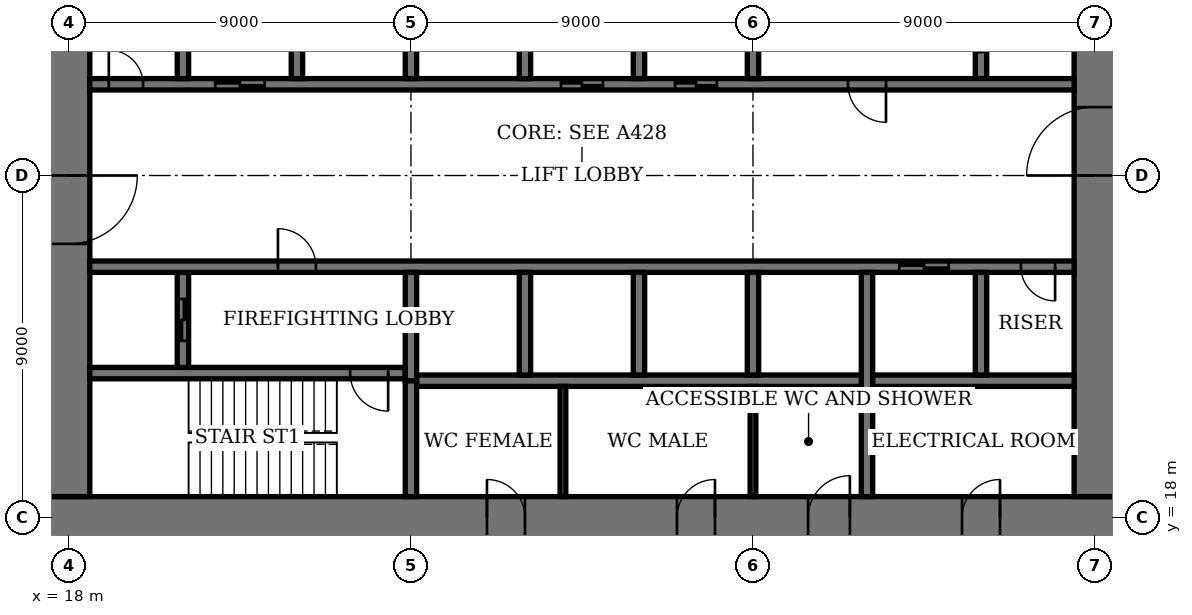
"""IFC4 building model, lengths in metres.
Left out: names, types, materials, properties, quantities, classifications, styles, units other than length and angle.
Written with IfcOpenShell. Run it as: python <this file> out.ifc"""

import sys

from ifc_helpers import new_model, si_unit, direction, frame, frame_2d, origin, place, context, subcontext, project, spatial, rectangle, extrude, element, fill, save


model = new_model("IFC4")
c1 = context("Model", 3, precision=1e-05, world=origin(), true_north=direction((0.0, 1.0)))
c2 = subcontext(c1, "Body", "Model", "MODEL_VIEW")
j1 = project(units=[si_unit("LENGTHUNIT", "METRE"), si_unit("PLANEANGLEUNIT", "RADIAN")], contexts=[c1])
p1 = place(None, origin())
s1 = spatial("IfcSite", under=j1, at=p1, CompositionType="ELEMENT")
p2 = place(p1, origin())
s2 = spatial("IfcBuilding", under=s1, at=p2, CompositionType="ELEMENT")
p3 = place(p2, frame((0.0, 0.0, 113.0)))
s3 = spatial("IfcBuildingStorey", under=s2, at=p3, CompositionType="ELEMENT", Elevation=113.0)
p4 = place(p3, frame((17.45, 18.0, 0.0), z_axis=(0.0, 0.0, 1.0), x_axis=(1.0, 0.0, 0.0)))
e1 = element("IfcWall", 1, at=p4, inside=s3, PredefinedType="SHEAR", context=c2, shape_type="SweptSolid", body=[
    extrude(rectangle(XDim=28.1, YDim=1.1, at=frame_2d((14.05, 0.0))), origin(), (0.0, 0.0, 1.0), 4.0),
])
p5 = place(p4, frame((11.55, 0.0, 0.0)))
e2 = element("IfcOpeningElement", 2, at=p5, cuts=e1, PredefinedType="OPENING", context=c2, shape_type="SweptSolid", body=[
    extrude(rectangle(XDim=1.0, YDim=2.4, at=frame_2d((0.5, 1.2))), frame((0.0, 0.56, 0.0), z_axis=(0.0, -1.0, 0.0), x_axis=(1.0, 0.0, 0.0)), (0.0, 0.0, 1.0), 1.12),
])
p6 = place(p4, frame((16.55, 0.0, 0.0)))
e3 = element("IfcOpeningElement", 3, at=p6, cuts=e1, PredefinedType="OPENING", context=c2, shape_type="SweptSolid", body=[
    extrude(rectangle(XDim=1.0, YDim=2.4, at=frame_2d((0.5, 1.2))), frame((0.0, 0.56, 0.0), z_axis=(0.0, -1.0, 0.0), x_axis=(1.0, 0.0, 0.0)), (0.0, 0.0, 1.0), 1.12),
])
p7 = place(p4, frame((20.0, 0.0, 0.0)))
e4 = element("IfcOpeningElement", 4, at=p7, cuts=e1, PredefinedType="OPENING", context=c2, shape_type="SweptSolid", body=[
    extrude(rectangle(XDim=1.1, YDim=2.4, at=frame_2d((0.55, 1.2))), frame((0.0, 0.56, 0.0), z_axis=(0.0, -1.0, 0.0), x_axis=(1.0, 0.0, 0.0)), (0.0, 0.0, 1.0), 1.12),
])
p8 = place(p4, frame((24.05, 0.0, 0.0)))
e5 = element("IfcOpeningElement", 5, at=p8, cuts=e1, PredefinedType="OPENING", context=c2, shape_type="SweptSolid", body=[
    extrude(rectangle(XDim=1.0, YDim=2.4, at=frame_2d((0.5, 1.2))), frame((0.0, 0.56, 0.0), z_axis=(0.0, -1.0, 0.0), x_axis=(1.0, 0.0, 0.0)), (0.0, 0.0, 1.0), 1.12),
])
p9 = place(p3, frame((18.0, 35.45, 0.0), z_axis=(0.0, 0.0, 1.0), x_axis=(0.0, -1.0, 0.0)))
e6 = element("IfcWall", 6, at=p9, inside=s3, PredefinedType="SHEAR", context=c2, shape_type="SweptSolid", body=[
    extrude(rectangle(XDim=16.9, YDim=1.1, at=frame_2d((8.45, 0.0))), origin(), (0.0, 0.0, 1.0), 4.0),
])
p10 = place(p9, frame((8.45, 0.0, 0.0)))
e7 = element("IfcOpeningElement", 7, at=p10, cuts=e6, PredefinedType="OPENING", context=c2, shape_type="SweptSolid", body=[
    extrude(rectangle(XDim=1.8, YDim=2.4, at=frame_2d((0.9, 1.2))), frame((0.0, 0.56, 0.0), z_axis=(0.0, -1.0, 0.0), x_axis=(1.0, 0.0, 0.0)), (0.0, 0.0, 1.0), 1.12),
])
p11 = place(p3, frame((45.0, 18.55, 0.0), z_axis=(0.0, 0.0, 1.0), x_axis=(0.0, 1.0, 0.0)))
e8 = element("IfcWall", 8, at=p11, inside=s3, PredefinedType="SHEAR", context=c2, shape_type="SweptSolid", body=[
    extrude(rectangle(XDim=16.9, YDim=1.1, at=frame_2d((8.45, 0.0))), origin(), (0.0, 0.0, 1.0), 4.0),
])
p12 = place(p11, frame((8.45, 0.0, 0.0)))
e9 = element("IfcOpeningElement", 9, at=p12, cuts=e8, PredefinedType="OPENING", context=c2, shape_type="SweptSolid", body=[
    extrude(rectangle(XDim=1.8, YDim=2.4, at=frame_2d((0.9, 1.2))), frame((0.0, 0.56, 0.0), z_axis=(0.0, -1.0, 0.0), x_axis=(1.0, 0.0, 0.0)), (0.0, 0.0, 1.0), 1.12),
])
p13 = place(p3, frame((18.55, 21.8, 0.0), z_axis=(0.0, 0.0, 1.0), x_axis=(1.0, 0.0, 0.0)))
e10 = element("IfcWall", 10, at=p13, inside=s3, PredefinedType="SHEAR", context=c2, shape_type="SweptSolid", body=[
    extrude(rectangle(XDim=8.3, YDim=0.3, at=frame_2d((4.15, 0.0))), origin(), (0.0, 0.0, 1.0), 4.0),
])
p14 = place(p13, frame((6.85, 0.0, 0.0)))
e11 = element("IfcOpeningElement", 11, at=p14, cuts=e10, PredefinedType="OPENING", context=c2, shape_type="SweptSolid", body=[
    extrude(rectangle(XDim=1.0, YDim=2.4, at=frame_2d((0.5, 1.2))), frame((0.0, 0.16, 0.0), z_axis=(0.0, -1.0, 0.0), x_axis=(1.0, 0.0, 0.0)), (0.0, 0.0, 1.0), 0.32),
])
p15 = place(p3, frame((27.0, 18.55, 0.0), z_axis=(0.0, 0.0, 1.0), x_axis=(0.0, 1.0, 0.0)))
e12 = element("IfcWall", 12, at=p15, inside=s3, PredefinedType="SHEAR", context=c2, shape_type="SweptSolid", body=[
    extrude(rectangle(XDim=3.05, YDim=0.3, at=frame_2d((1.525, 0.0))), origin(), (0.0, 0.0, 1.0), 4.0),
])
p16 = place(p3, frame((21.0, 21.95, 0.0), z_axis=(0.0, 0.0, 1.0), x_axis=(0.0, 1.0, 0.0)))
e13 = element("IfcWall", 13, at=p16, inside=s3, PredefinedType="SHEAR", context=c2, shape_type="SweptSolid", body=[
    extrude(rectangle(XDim=2.5, YDim=0.3, at=frame_2d((1.25, 0.0))), origin(), (0.0, 0.0, 1.0), 4.0),
])
p17 = place(p16, frame((0.7, 0.0, 0.0)))
e14 = element("IfcOpeningElement", 14, at=p17, cuts=e13, PredefinedType="OPENING", context=c2, shape_type="SweptSolid", body=[
    extrude(rectangle(XDim=1.1, YDim=2.4, at=frame_2d((0.55, 1.2))), frame((0.0, 0.16, 0.0), z_axis=(0.0, -1.0, 0.0), x_axis=(1.0, 0.0, 0.0)), (0.0, 0.0, 1.0), 0.32),
])
p18 = place(p3, frame((42.0, 29.55, 0.0), z_axis=(0.0, 0.0, 1.0), x_axis=(0.0, 1.0, 0.0)))
e15 = element("IfcWall", 15, at=p18, inside=s3, PredefinedType="SHEAR", context=c2, shape_type="SweptSolid", body=[
    extrude(rectangle(XDim=2.5, YDim=0.3, at=frame_2d((1.25, 0.0))), origin(), (0.0, 0.0, 1.0), 4.0),
])
p19 = place(p18, frame((0.7, 0.0, 0.0)))
e16 = element("IfcOpeningElement", 16, at=p19, cuts=e15, PredefinedType="OPENING", context=c2, shape_type="SweptSolid", body=[
    extrude(rectangle(XDim=1.1, YDim=2.4, at=frame_2d((0.55, 1.2))), frame((0.0, 0.16, 0.0), z_axis=(0.0, -1.0, 0.0), x_axis=(1.0, 0.0, 0.0)), (0.0, 0.0, 1.0), 0.32),
])
p20 = place(p3, frame((18.55, 24.6, 0.0), z_axis=(0.0, 0.0, 1.0), x_axis=(1.0, 0.0, 0.0)))
e17 = element("IfcWall", 17, at=p20, inside=s3, PredefinedType="SHEAR", context=c2, shape_type="SweptSolid", body=[
    extrude(rectangle(XDim=25.9, YDim=0.3, at=frame_2d((12.95, 0.0))), origin(), (0.0, 0.0, 1.0), 4.0),
])
p21 = place(p20, frame((4.95, 0.0, 0.0)))
e18 = element("IfcOpeningElement", 18, at=p21, cuts=e17, PredefinedType="OPENING", context=c2, shape_type="SweptSolid", body=[
    extrude(rectangle(XDim=1.0, YDim=2.4, at=frame_2d((0.5, 1.2))), frame((0.0, 0.16, 0.0), z_axis=(0.0, -1.0, 0.0), x_axis=(1.0, 0.0, 0.0)), (0.0, 0.0, 1.0), 0.32),
])
p22 = place(p20, frame((24.5, 0.0, 0.0)))
e19 = element("IfcOpeningElement", 19, at=p22, cuts=e17, PredefinedType="OPENING", context=c2, shape_type="SweptSolid", body=[
    extrude(rectangle(XDim=0.9, YDim=2.1, at=frame_2d((0.45, 1.05))), frame((0.0, 0.16, 0.0), z_axis=(0.0, -1.0, 0.0), x_axis=(1.0, 0.0, 0.0)), (0.0, 0.0, 1.0), 0.32),
])
p23 = place(p20, frame((21.3, 0.0, 0.0)))
e20 = element("IfcOpeningElement", 20, at=p23, cuts=e17, PredefinedType="OPENING", context=c2, shape_type="SweptSolid", body=[
    extrude(rectangle(XDim=1.3, YDim=2.4, at=frame_2d((0.65, 1.2))), frame((0.0, 0.16, 0.0), z_axis=(0.0, -1.0, 0.0), x_axis=(1.0, 0.0, 0.0)), (0.0, 0.0, 1.0), 0.32),
])
p24 = place(p3, frame((18.55, 29.4, 0.0), z_axis=(0.0, 0.0, 1.0), x_axis=(1.0, 0.0, 0.0)))
e21 = element("IfcWall", 21, at=p24, inside=s3, PredefinedType="SHEAR", context=c2, shape_type="SweptSolid", body=[
    extrude(rectangle(XDim=25.9, YDim=0.3, at=frame_2d((12.95, 0.0))), origin(), (0.0, 0.0, 1.0), 4.0),
])
p25 = place(p24, frame((19.95, 0.0, 0.0)))
e22 = element("IfcOpeningElement", 22, at=p25, cuts=e21, PredefinedType="OPENING", context=c2, shape_type="SweptSolid", body=[
    extrude(rectangle(XDim=1.0, YDim=2.4, at=frame_2d((0.5, 1.2))), frame((0.0, 0.16, 0.0), z_axis=(0.0, -1.0, 0.0), x_axis=(1.0, 0.0, 0.0)), (0.0, 0.0, 1.0), 0.32),
])
p26 = place(p24, frame((0.5, 0.0, 0.0)))
e23 = element("IfcOpeningElement", 23, at=p26, cuts=e21, PredefinedType="OPENING", context=c2, shape_type="SweptSolid", body=[
    extrude(rectangle(XDim=0.9, YDim=2.1, at=frame_2d((0.45, 1.05))), frame((0.0, 0.16, 0.0), z_axis=(0.0, -1.0, 0.0), x_axis=(1.0, 0.0, 0.0)), (0.0, 0.0, 1.0), 0.32),
])
p27 = place(p24, frame((15.4, 0.0, 0.0)))
e24 = element("IfcOpeningElement", 24, at=p27, cuts=e21, PredefinedType="OPENING", context=c2, shape_type="SweptSolid", body=[
    extrude(rectangle(XDim=1.1, YDim=2.4, at=frame_2d((0.55, 1.2))), frame((0.0, 0.16, 0.0), z_axis=(0.0, -1.0, 0.0), x_axis=(1.0, 0.0, 0.0)), (0.0, 0.0, 1.0), 0.32),
])
p28 = place(p24, frame((12.4, 0.0, 0.0)))
e25 = element("IfcOpeningElement", 25, at=p28, cuts=e21, PredefinedType="OPENING", context=c2, shape_type="SweptSolid", body=[
    extrude(rectangle(XDim=1.1, YDim=2.4, at=frame_2d((0.55, 1.2))), frame((0.0, 0.16, 0.0), z_axis=(0.0, -1.0, 0.0), x_axis=(1.0, 0.0, 0.0)), (0.0, 0.0, 1.0), 0.32),
])
p29 = place(p24, frame((3.3, 0.0, 0.0)))
e26 = element("IfcOpeningElement", 26, at=p29, cuts=e21, PredefinedType="OPENING", context=c2, shape_type="SweptSolid", body=[
    extrude(rectangle(XDim=1.3, YDim=2.4, at=frame_2d((0.65, 1.2))), frame((0.0, 0.16, 0.0), z_axis=(0.0, -1.0, 0.0), x_axis=(1.0, 0.0, 0.0)), (0.0, 0.0, 1.0), 0.32),
])
p30 = place(p3, frame((27.15, 21.6, 0.0), z_axis=(0.0, 0.0, 1.0), x_axis=(1.0, 0.0, 0.0)))
e27 = element("IfcWall", 27, at=p30, inside=s3, PredefinedType="SHEAR", context=c2, shape_type="SweptSolid", body=[
    extrude(rectangle(XDim=17.3, YDim=0.3, at=frame_2d((8.65, 0.0))), origin(), (0.0, 0.0, 1.0), 4.0),
])
for number, where, z_axis, x_axis in (
    (28, (30.0, 21.75, 0.0), (0.0, 0.0, 1.0), (0.0, 1.0, 0.0)),
    (29, (33.0, 29.55, 0.0), (0.0, 0.0, 1.0), (0.0, 1.0, 0.0)),
    (30, (33.0, 21.75, 0.0), (0.0, 0.0, 1.0), (0.0, 1.0, 0.0)),
    (31, (30.0, 29.55, 0.0), (0.0, 0.0, 1.0), (0.0, 1.0, 0.0)),
    (32, (36.0, 21.75, 0.0), (0.0, 0.0, 1.0), (0.0, 1.0, 0.0)),
    (33, (27.0, 29.55, 0.0), (0.0, 0.0, 1.0), (0.0, 1.0, 0.0)),
):
    element("IfcWall", number, at=place(p3, frame(where, z_axis=z_axis, x_axis=x_axis)), inside=s3, PredefinedType="SHEAR", context=c2, shape_type="SweptSolid", body=[
        extrude(rectangle(XDim=2.7, YDim=0.3, at=frame_2d((1.35, 0.0))), origin(), (0.0, 0.0, 1.0), 4.0),
    ])
for number, where, z_axis, x_axis in (
    (34, (39.0, 18.55, 0.0), (0.0, 0.0, 1.0), (0.0, 1.0, 0.0)),
    (35, (24.0, 29.55, 0.0), (0.0, 0.0, 1.0), (0.0, 1.0, 0.0)),
):
    element("IfcWall", number, at=place(p3, frame(where, z_axis=z_axis, x_axis=x_axis)), inside=s3, PredefinedType="SHEAR", context=c2, shape_type="SweptSolid", body=[
        extrude(rectangle(XDim=5.9, YDim=0.3, at=frame_2d((2.95, 0.0))), origin(), (0.0, 0.0, 1.0), 4.0),
    ])
for number, where, z_axis, x_axis in (
    (36, (42.0, 21.75, 0.0), (0.0, 0.0, 1.0), (0.0, 1.0, 0.0)),
    (37, (21.0, 29.55, 0.0), (0.0, 0.0, 1.0), (0.0, 1.0, 0.0)),
):
    element("IfcWall", number, at=place(p3, frame(where, z_axis=z_axis, x_axis=x_axis)), inside=s3, PredefinedType="SHEAR", context=c2, shape_type="SweptSolid", body=[
        extrude(rectangle(XDim=2.7, YDim=0.3, at=frame_2d((1.35, 0.0))), origin(), (0.0, 0.0, 1.0), 4.0),
    ])
for number, where, z_axis, x_axis in (
    (38, (27.0, 21.6, 0.0), (0.0, 0.0, 1.0), (0.0, 1.0, 0.0)),
    (39, (36.0, 29.55, 0.0), (0.0, 0.0, 1.0), (0.0, 1.0, 0.0)),
):
    element("IfcWall", number, at=place(p3, frame(where, z_axis=z_axis, x_axis=x_axis)), inside=s3, PredefinedType="SHEAR", context=c2, shape_type="SweptSolid", body=[
        extrude(rectangle(XDim=2.85, YDim=0.3, at=frame_2d((1.425, 0.0))), origin(), (0.0, 0.0, 1.0), 4.0),
    ])
for number, where, z_axis, x_axis in (
    (40, (31.0, 18.55, 0.0), (0.0, 0.0, 1.0), (0.0, 1.0, 0.0)),
    (41, (36.0, 18.55, 0.0), (0.0, 0.0, 1.0), (0.0, 1.0, 0.0)),
):
    element("IfcWall", number, at=place(p3, frame(where, z_axis=z_axis, x_axis=x_axis)), inside=s3, PredefinedType="PARTITIONING", context=c2, shape_type="SweptSolid", body=[
        extrude(rectangle(XDim=2.9, YDim=0.15, at=frame_2d((1.45, 0.0))), origin(), (0.0, 0.0, 1.0), 3.75),
    ])
p31 = place(p10, origin())
e42 = element("IfcDoor", 42, at=p31, inside=s3, OperationType="DOUBLE_DOOR_DOUBLE_SWING", PredefinedType="DOOR", context=c2, shape_type="SweptSolid", body=[
    extrude(rectangle(XDim=1.8, YDim=2.4, at=frame_2d((0.9, 1.2))), frame((0.0, 0.03, 0.0), z_axis=(0.0, -1.0, 0.0), x_axis=(1.0, 0.0, 0.0)), (0.0, 0.0, 1.0), 0.06),
    extrude(rectangle(XDim=0.04, YDim=2.4, at=frame_2d((0.02, 1.2))), frame((0.0, 0.55, 0.0), z_axis=(0.0, -1.0, 0.0), x_axis=(1.0, 0.0, 0.0)), (0.0, 0.0, 1.0), 1.1),
    extrude(rectangle(XDim=0.04, YDim=2.4, at=frame_2d((1.78, 1.2))), frame((0.0, 0.55, 0.0), z_axis=(0.0, -1.0, 0.0), x_axis=(1.0, 0.0, 0.0)), (0.0, 0.0, 1.0), 1.1),
    extrude(rectangle(XDim=1.8, YDim=0.04, at=frame_2d((0.9, 2.38))), frame((0.0, 0.55, 0.0), z_axis=(0.0, -1.0, 0.0), x_axis=(1.0, 0.0, 0.0)), (0.0, 0.0, 1.0), 1.1),
])
fill(e7, e42)
p32 = place(p12, origin())
e43 = element("IfcDoor", 43, at=p32, inside=s3, OperationType="DOUBLE_DOOR_DOUBLE_SWING", PredefinedType="DOOR", context=c2, shape_type="SweptSolid", body=[
    extrude(rectangle(XDim=1.8, YDim=2.4, at=frame_2d((0.9, 1.2))), frame((0.0, 0.03, 0.0), z_axis=(0.0, -1.0, 0.0), x_axis=(1.0, 0.0, 0.0)), (0.0, 0.0, 1.0), 0.06),
    extrude(rectangle(XDim=0.04, YDim=2.4, at=frame_2d((0.02, 1.2))), frame((0.0, 0.55, 0.0), z_axis=(0.0, -1.0, 0.0), x_axis=(1.0, 0.0, 0.0)), (0.0, 0.0, 1.0), 1.1),
    extrude(rectangle(XDim=0.04, YDim=2.4, at=frame_2d((1.78, 1.2))), frame((0.0, 0.55, 0.0), z_axis=(0.0, -1.0, 0.0), x_axis=(1.0, 0.0, 0.0)), (0.0, 0.0, 1.0), 1.1),
    extrude(rectangle(XDim=1.8, YDim=0.04, at=frame_2d((0.9, 2.38))), frame((0.0, 0.55, 0.0), z_axis=(0.0, -1.0, 0.0), x_axis=(1.0, 0.0, 0.0)), (0.0, 0.0, 1.0), 1.1),
])
fill(e9, e43)
p33 = place(p5, origin())
e44 = element("IfcDoor", 44, at=p33, inside=s3, OperationType="SINGLE_SWING_RIGHT", PredefinedType="DOOR", context=c2, shape_type="SweptSolid", body=[
    extrude(rectangle(XDim=1.0, YDim=2.4, at=frame_2d((0.5, 1.2))), frame((0.0, 0.025, 0.0), z_axis=(0.0, -1.0, 0.0), x_axis=(1.0, 0.0, 0.0)), (0.0, 0.0, 1.0), 0.05),
    extrude(rectangle(XDim=0.04, YDim=2.4, at=frame_2d((0.02, 1.2))), frame((0.0, 0.4, 0.0), z_axis=(0.0, -1.0, 0.0), x_axis=(1.0, 0.0, 0.0)), (0.0, 0.0, 1.0), 0.8),
    extrude(rectangle(XDim=0.04, YDim=2.4, at=frame_2d((0.98, 1.2))), frame((0.0, 0.4, 0.0), z_axis=(0.0, -1.0, 0.0), x_axis=(1.0, 0.0, 0.0)), (0.0, 0.0, 1.0), 0.8),
    extrude(rectangle(XDim=1.0, YDim=0.04, at=frame_2d((0.5, 2.38))), frame((0.0, 0.4, 0.0), z_axis=(0.0, -1.0, 0.0), x_axis=(1.0, 0.0, 0.0)), (0.0, 0.0, 1.0), 0.8),
])
fill(e2, e44)
p34 = place(p6, origin())
e45 = element("IfcDoor", 45, at=p34, inside=s3, OperationType="SINGLE_SWING_LEFT", PredefinedType="DOOR", context=c2, shape_type="SweptSolid", body=[
    extrude(rectangle(XDim=1.0, YDim=2.4, at=frame_2d((0.5, 1.2))), frame((0.0, 0.025, 0.0), z_axis=(0.0, -1.0, 0.0), x_axis=(1.0, 0.0, 0.0)), (0.0, 0.0, 1.0), 0.05),
    extrude(rectangle(XDim=0.04, YDim=2.4, at=frame_2d((0.02, 1.2))), frame((0.0, 0.4, 0.0), z_axis=(0.0, -1.0, 0.0), x_axis=(1.0, 0.0, 0.0)), (0.0, 0.0, 1.0), 0.8),
    extrude(rectangle(XDim=0.04, YDim=2.4, at=frame_2d((0.98, 1.2))), frame((0.0, 0.4, 0.0), z_axis=(0.0, -1.0, 0.0), x_axis=(1.0, 0.0, 0.0)), (0.0, 0.0, 1.0), 0.8),
    extrude(rectangle(XDim=1.0, YDim=0.04, at=frame_2d((0.5, 2.38))), frame((0.0, 0.4, 0.0), z_axis=(0.0, -1.0, 0.0), x_axis=(1.0, 0.0, 0.0)), (0.0, 0.0, 1.0), 0.8),
])
fill(e3, e45)
p35 = place(p7, origin())
e46 = element("IfcDoor", 46, at=p35, inside=s3, OperationType="SINGLE_SWING_LEFT", PredefinedType="DOOR", context=c2, shape_type="SweptSolid", body=[
    extrude(rectangle(XDim=1.1, YDim=2.4, at=frame_2d((0.55, 1.2))), frame((0.0, 0.025, 0.0), z_axis=(0.0, -1.0, 0.0), x_axis=(1.0, 0.0, 0.0)), (0.0, 0.0, 1.0), 0.05),
    extrude(rectangle(XDim=0.04, YDim=2.4, at=frame_2d((0.02, 1.2))), frame((0.0, 0.44, 0.0), z_axis=(0.0, -1.0, 0.0), x_axis=(1.0, 0.0, 0.0)), (0.0, 0.0, 1.0), 0.88),
    extrude(rectangle(XDim=0.04, YDim=2.4, at=frame_2d((1.08, 1.2))), frame((0.0, 0.44, 0.0), z_axis=(0.0, -1.0, 0.0), x_axis=(1.0, 0.0, 0.0)), (0.0, 0.0, 1.0), 0.88),
    extrude(rectangle(XDim=1.1, YDim=0.04, at=frame_2d((0.55, 2.38))), frame((0.0, 0.44, 0.0), z_axis=(0.0, -1.0, 0.0), x_axis=(1.0, 0.0, 0.0)), (0.0, 0.0, 1.0), 0.88),
])
fill(e4, e46)
p36 = place(p8, origin())
e47 = element("IfcDoor", 47, at=p36, inside=s3, OperationType="SINGLE_SWING_LEFT", PredefinedType="DOOR", context=c2, shape_type="SweptSolid", body=[
    extrude(rectangle(XDim=1.0, YDim=2.4, at=frame_2d((0.5, 1.2))), frame((0.0, 0.025, 0.0), z_axis=(0.0, -1.0, 0.0), x_axis=(1.0, 0.0, 0.0)), (0.0, 0.0, 1.0), 0.05),
    extrude(rectangle(XDim=0.04, YDim=2.4, at=frame_2d((0.02, 1.2))), frame((0.0, 0.4, 0.0), z_axis=(0.0, -1.0, 0.0), x_axis=(1.0, 0.0, 0.0)), (0.0, 0.0, 1.0), 0.8),
    extrude(rectangle(XDim=0.04, YDim=2.4, at=frame_2d((0.98, 1.2))), frame((0.0, 0.4, 0.0), z_axis=(0.0, -1.0, 0.0), x_axis=(1.0, 0.0, 0.0)), (0.0, 0.0, 1.0), 0.8),
    extrude(rectangle(XDim=1.0, YDim=0.04, at=frame_2d((0.5, 2.38))), frame((0.0, 0.4, 0.0), z_axis=(0.0, -1.0, 0.0), x_axis=(1.0, 0.0, 0.0)), (0.0, 0.0, 1.0), 0.8),
])
fill(e5, e47)
p37 = place(p14, origin())
e48 = element("IfcDoor", 48, at=p37, inside=s3, OperationType="SINGLE_SWING_RIGHT", PredefinedType="DOOR", context=c2, shape_type="SweptSolid", body=[
    extrude(rectangle(XDim=1.0, YDim=2.4, at=frame_2d((0.5, 1.2))), frame((0.0, 0.03, 0.0), z_axis=(0.0, -1.0, 0.0), x_axis=(1.0, 0.0, 0.0)), (0.0, 0.0, 1.0), 0.06),
])
fill(e11, e48)
p38 = place(p21, origin())
e49 = element("IfcDoor", 49, at=p38, inside=s3, OperationType="SINGLE_SWING_RIGHT", PredefinedType="DOOR", context=c2, shape_type="SweptSolid", body=[
    extrude(rectangle(XDim=1.0, YDim=2.4, at=frame_2d((0.5, 1.2))), frame((0.0, 0.03, 0.0), z_axis=(0.0, -1.0, 0.0), x_axis=(1.0, 0.0, 0.0)), (0.0, 0.0, 1.0), 0.06),
])
fill(e18, e49)
p39 = place(p25, origin())
e50 = element("IfcDoor", 50, at=p39, inside=s3, OperationType="SINGLE_SWING_RIGHT", PredefinedType="DOOR", context=c2, shape_type="SweptSolid", body=[
    extrude(rectangle(XDim=1.0, YDim=2.4, at=frame_2d((0.5, 1.2))), frame((0.0, 0.03, 0.0), z_axis=(0.0, -1.0, 0.0), x_axis=(1.0, 0.0, 0.0)), (0.0, 0.0, 1.0), 0.06),
])
fill(e22, e50)
p40 = place(p22, origin())
e51 = element("IfcDoor", 51, at=p40, inside=s3, OperationType="SINGLE_SWING_RIGHT", PredefinedType="DOOR", context=c2, shape_type="SweptSolid", body=[
    extrude(rectangle(XDim=0.9, YDim=2.1, at=frame_2d((0.45, 1.05))), frame((0.0, 0.03, 0.0), z_axis=(0.0, -1.0, 0.0), x_axis=(1.0, 0.0, 0.0)), (0.0, 0.0, 1.0), 0.06),
])
fill(e19, e51)
p41 = place(p26, origin())
e52 = element("IfcDoor", 52, at=p41, inside=s3, OperationType="SINGLE_SWING_RIGHT", PredefinedType="DOOR", context=c2, shape_type="SweptSolid", body=[
    extrude(rectangle(XDim=0.9, YDim=2.1, at=frame_2d((0.45, 1.05))), frame((0.0, 0.03, 0.0), z_axis=(0.0, -1.0, 0.0), x_axis=(1.0, 0.0, 0.0)), (0.0, 0.0, 1.0), 0.06),
])
fill(e23, e52)
p42 = place(p27, origin())
e53 = element("IfcDoor", 53, at=p42, inside=s3, OperationType="DOUBLE_DOOR_SLIDING", PredefinedType="DOOR", context=c2, shape_type="SweptSolid", body=[
    extrude(rectangle(XDim=1.1, YDim=2.4, at=frame_2d((0.55, 1.2))), frame((0.0, 0.02, 0.0), z_axis=(0.0, -1.0, 0.0), x_axis=(1.0, 0.0, 0.0)), (0.0, 0.0, 1.0), 0.04),
])
fill(e24, e53)
p43 = place(p28, origin())
e54 = element("IfcDoor", 54, at=p43, inside=s3, OperationType="DOUBLE_DOOR_SLIDING", PredefinedType="DOOR", context=c2, shape_type="SweptSolid", body=[
    extrude(rectangle(XDim=1.1, YDim=2.4, at=frame_2d((0.55, 1.2))), frame((0.0, 0.02, 0.0), z_axis=(0.0, -1.0, 0.0), x_axis=(1.0, 0.0, 0.0)), (0.0, 0.0, 1.0), 0.04),
])
fill(e25, e54)
p44 = place(p23, origin())
e55 = element("IfcDoor", 55, at=p44, inside=s3, OperationType="DOUBLE_DOOR_SLIDING", PredefinedType="DOOR", context=c2, shape_type="SweptSolid", body=[
    extrude(rectangle(XDim=1.3, YDim=2.4, at=frame_2d((0.65, 1.2))), frame((0.0, 0.02, 0.0), z_axis=(0.0, -1.0, 0.0), x_axis=(1.0, 0.0, 0.0)), (0.0, 0.0, 1.0), 0.04),
])
fill(e20, e55)
p45 = place(p29, origin())
e56 = element("IfcDoor", 56, at=p45, inside=s3, OperationType="DOUBLE_DOOR_SLIDING", PredefinedType="DOOR", context=c2, shape_type="SweptSolid", body=[
    extrude(rectangle(XDim=1.3, YDim=2.4, at=frame_2d((0.65, 1.2))), frame((0.0, 0.02, 0.0), z_axis=(0.0, -1.0, 0.0), x_axis=(1.0, 0.0, 0.0)), (0.0, 0.0, 1.0), 0.04),
])
fill(e26, e56)
p46 = place(p17, origin())
e57 = element("IfcDoor", 57, at=p46, inside=s3, OperationType="DOUBLE_DOOR_SLIDING", PredefinedType="DOOR", context=c2, shape_type="SweptSolid", body=[
    extrude(rectangle(XDim=1.1, YDim=2.4, at=frame_2d((0.55, 1.2))), frame((0.0, 0.03, 0.0), z_axis=(0.0, -1.0, 0.0), x_axis=(1.0, 0.0, 0.0)), (0.0, 0.0, 1.0), 0.06),
])
fill(e14, e57)
save(model, sys.argv[1])
